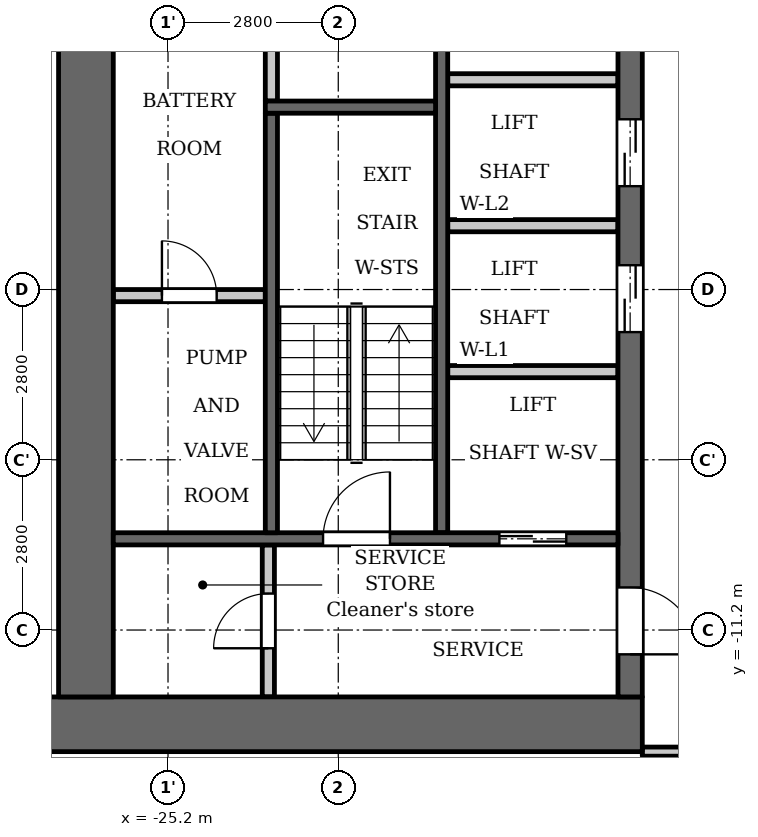
"""IFC4 building model, lengths in metres.
Left out: names, types, materials, properties, quantities, classifications, styles, units other than length and angle.
Written with IfcOpenShell. Run it as: python <this file> out.ifc"""

import sys

from ifc_helpers import new_model, si_unit, direction, frame, frame_2d, origin, place, context, subcontext, project, spatial, rectangle, extrude, element, fill, save


model = new_model("IFC4")
c1 = context("Model", 3, precision=1e-05, world=origin(), true_north=direction((0.0, 1.0)))
c2 = subcontext(c1, "Body", "Model", "MODEL_VIEW")
j1 = project(units=[si_unit("LENGTHUNIT", "METRE"), si_unit("PLANEANGLEUNIT", "RADIAN")], contexts=[c1])
p1 = place(None, origin())
s1 = spatial("IfcSite", under=j1, at=p1, CompositionType="ELEMENT")
p2 = place(p1, origin())
s2 = spatial("IfcBuilding", under=s1, at=p2, CompositionType="ELEMENT")
p3 = place(p2, frame((0.0, 0.0, 93.8)))
s3 = spatial("IfcBuildingStorey", under=s2, at=p3, CompositionType="ELEMENT", Elevation=93.8)
p4 = place(p3, frame((-23.5, -2.5, 0.0), z_axis=(0.0, 0.0, 1.0), x_axis=(0.0, 1.0, 0.0)))
e1 = element("IfcWall", 1, at=p4, inside=s3, PredefinedType="PARTITIONING", context=c2, shape_type="SweptSolid", body=[
    extrude(rectangle(XDim=2.65, YDim=0.2, at=frame_2d((1.325, 0.0))), origin(), (0.0, 0.0, 1.0), 3.2),
])
p5 = place(p3, frame((-20.7, -9.6, 0.0), z_axis=(0.0, 0.0, 1.0), x_axis=(0.0, 1.0, 0.0)))
e2 = element("IfcWall", 2, at=p5, inside=s3, PredefinedType="SHEAR", context=c2, shape_type="SweptSolid", body=[
    extrude(rectangle(XDim=9.75, YDim=0.2, at=frame_2d((4.875, 0.0))), origin(), (0.0, 0.0, 1.0), 3.2),
])
p6 = place(p3, frame((-17.4, -12.75, 0.0), z_axis=(0.0, 0.0, 1.0), x_axis=(-1.0, 0.0, 0.0)))
e3 = element("IfcWall", 3, at=p6, inside=s3, PredefinedType="SHEAR", context=c2, shape_type="SweptSolid", body=[
    extrude(rectangle(XDim=10.4, YDim=0.9, at=frame_2d((5.2, 0.0))), origin(), (0.0, 0.0, 1.0), 3.2),
])
p7 = place(p3, frame((-17.6, -12.3, 0.0), z_axis=(0.0, 0.0, 1.0), x_axis=(0.0, 1.0, 0.0)))
e4 = element("IfcWall", 4, at=p7, inside=s3, PredefinedType="SHEAR", context=c2, shape_type="SweptSolid", body=[
    extrude(rectangle(XDim=24.6, YDim=0.4, at=frame_2d((12.3, 0.0))), origin(), (0.0, 0.0, 1.0), 3.2),
])
p8 = place(p7, frame((6.0, 0.0, 0.0)))
e5 = element("IfcOpeningElement", 5, at=p8, cuts=e4, PredefinedType="OPENING", context=c2, shape_type="SweptSolid", body=[
    extrude(rectangle(XDim=1.1, YDim=2.1, at=frame_2d((0.55, 1.05))), frame((0.0, 0.21, 0.0), z_axis=(0.0, -1.0, 0.0), x_axis=(1.0, 0.0, 0.0)), (0.0, 0.0, 1.0), 0.42),
])
p9 = place(p7, frame((8.4, 0.0, 0.0)))
e6 = element("IfcOpeningElement", 6, at=p9, cuts=e4, PredefinedType="OPENING", context=c2, shape_type="SweptSolid", body=[
    extrude(rectangle(XDim=1.1, YDim=2.1, at=frame_2d((0.55, 1.05))), frame((0.0, 0.21, 0.0), z_axis=(0.0, -1.0, 0.0), x_axis=(1.0, 0.0, 0.0)), (0.0, 0.0, 1.0), 0.42),
])
p10 = place(p7, frame((10.8, 0.0, 0.0)))
e7 = element("IfcOpeningElement", 7, at=p10, cuts=e4, PredefinedType="OPENING", context=c2, shape_type="SweptSolid", body=[
    extrude(rectangle(XDim=1.1, YDim=2.1, at=frame_2d((0.55, 1.05))), frame((0.0, 0.21, 0.0), z_axis=(0.0, -1.0, 0.0), x_axis=(1.0, 0.0, 0.0)), (0.0, 0.0, 1.0), 0.42),
])
p11 = place(p7, frame((16.75, 0.0, 0.0)))
e8 = element("IfcOpeningElement", 8, at=p11, cuts=e4, PredefinedType="OPENING", context=c2, shape_type="SweptSolid", body=[
    extrude(rectangle(XDim=0.9, YDim=2.1, at=frame_2d((0.45, 1.05))), frame((0.0, 0.21, 0.0), z_axis=(0.0, -1.0, 0.0), x_axis=(1.0, 0.0, 0.0)), (0.0, 0.0, 1.0), 0.42),
])
p12 = place(p7, frame((22.8, 0.0, 0.0)))
e9 = element("IfcOpeningElement", 9, at=p12, cuts=e4, PredefinedType="OPENING", context=c2, shape_type="SweptSolid", body=[
    extrude(rectangle(XDim=1.1, YDim=2.1, at=frame_2d((0.55, 1.05))), frame((0.0, 0.21, 0.0), z_axis=(0.0, -1.0, 0.0), x_axis=(1.0, 0.0, 0.0)), (0.0, 0.0, 1.0), 0.42),
])
p13 = place(p7, frame((0.7, 0.0, 0.0)))
e10 = element("IfcOpeningElement", 10, at=p13, cuts=e4, PredefinedType="OPENING", context=c2, shape_type="SweptSolid", body=[
    extrude(rectangle(XDim=1.1, YDim=2.1, at=frame_2d((0.55, 1.05))), frame((0.0, 0.21, 0.0), z_axis=(0.0, -1.0, 0.0), x_axis=(1.0, 0.0, 0.0)), (0.0, 0.0, 1.0), 0.42),
])
p14 = place(p7, frame((12.775, 0.0, 0.0)))
e11 = element("IfcOpeningElement", 11, at=p14, cuts=e4, PredefinedType="OPENING", context=c2, shape_type="SweptSolid", body=[
    extrude(rectangle(XDim=1.8, YDim=2.1, at=frame_2d((0.9, 1.05))), frame((0.0, 0.21, 0.0), z_axis=(0.0, -1.0, 0.0), x_axis=(1.0, 0.0, 0.0)), (0.0, 0.0, 1.0), 0.42),
])
p15 = place(p3, frame((-26.55, -12.3, 0.0), z_axis=(0.0, 0.0, 1.0), x_axis=(0.0, 1.0, 0.0)))
e12 = element("IfcWall", 12, at=p15, inside=s3, PredefinedType="SHEAR", context=c2, shape_type="SweptSolid", body=[
    extrude(rectangle(XDim=24.6, YDim=0.9, at=frame_2d((12.3, 0.0))), origin(), (0.0, 0.0, 1.0), 3.2),
])
p16 = place(p3, frame((-23.55, -12.3, 0.0), z_axis=(0.0, 0.0, 1.0), x_axis=(0.0, 1.0, 0.0)))
e13 = element("IfcWall", 13, at=p16, inside=s3, PredefinedType="PARTITIONING", context=c2, shape_type="SweptSolid", body=[
    extrude(rectangle(XDim=2.5, YDim=0.2, at=frame_2d((1.25, 0.0))), origin(), (0.0, 0.0, 1.0), 3.2),
])
p17 = place(p16, frame((0.8, 0.0, 0.0)))
e14 = element("IfcOpeningElement", 14, at=p17, cuts=e13, PredefinedType="OPENING", context=c2, shape_type="SweptSolid", body=[
    extrude(rectangle(XDim=0.9, YDim=2.1, at=frame_2d((0.45, 1.05))), frame((0.0, 0.11, 0.0), z_axis=(0.0, -1.0, 0.0), x_axis=(1.0, 0.0, 0.0)), (0.0, 0.0, 1.0), 0.22),
])
p18 = place(p3, frame((-23.6, -5.7, 0.0), z_axis=(0.0, 0.0, 1.0), x_axis=(-1.0, 0.0, 0.0)))
e15 = element("IfcWall", 15, at=p18, inside=s3, PredefinedType="PARTITIONING", context=c2, shape_type="SweptSolid", body=[
    extrude(rectangle(XDim=2.5, YDim=0.2, at=frame_2d((1.25, 0.0))), origin(), (0.0, 0.0, 1.0), 3.2),
])
p19 = place(p18, frame((0.8, 0.0, 0.0)))
e16 = element("IfcOpeningElement", 16, at=p19, cuts=e15, PredefinedType="OPENING", context=c2, shape_type="SweptSolid", body=[
    extrude(rectangle(XDim=0.9, YDim=2.1, at=frame_2d((0.45, 1.05))), frame((0.0, 0.11, 0.0), z_axis=(0.0, -1.0, 0.0), x_axis=(1.0, 0.0, 0.0)), (0.0, 0.0, 1.0), 0.22),
])
p20 = place(p3, frame((-17.8, -9.7, 0.0), z_axis=(0.0, 0.0, 1.0), x_axis=(-1.0, 0.0, 0.0)))
e17 = element("IfcWall", 17, at=p20, inside=s3, PredefinedType="SHEAR", context=c2, shape_type="SweptSolid", body=[
    extrude(rectangle(XDim=8.3, YDim=0.2, at=frame_2d((4.15, 0.0))), origin(), (0.0, 0.0, 1.0), 3.2),
])
p21 = place(p20, frame((0.85, 0.0, 0.0)))
e18 = element("IfcOpeningElement", 18, at=p21, cuts=e17, PredefinedType="OPENING", context=c2, shape_type="SweptSolid", body=[
    extrude(rectangle(XDim=1.1, YDim=2.1, at=frame_2d((0.55, 1.05))), frame((0.0, 0.11, 0.0), z_axis=(0.0, -1.0, 0.0), x_axis=(1.0, 0.0, 0.0)), (0.0, 0.0, 1.0), 0.22),
])
p22 = place(p20, frame((3.75, 0.0, 0.0)))
e19 = element("IfcOpeningElement", 19, at=p22, cuts=e17, PredefinedType="OPENING", context=c2, shape_type="SweptSolid", body=[
    extrude(rectangle(XDim=1.1, YDim=2.1, at=frame_2d((0.55, 1.05))), frame((0.0, 0.11, 0.0), z_axis=(0.0, -1.0, 0.0), x_axis=(1.0, 0.0, 0.0)), (0.0, 0.0, 1.0), 0.22),
])
for number, where, z_axis, x_axis in (
    (20, (-17.8, -6.95, 0.0), (0.0, 0.0, 1.0), (-1.0, 0.0, 0.0)),
    (21, (-17.8, -4.55, 0.0), (0.0, 0.0, 1.0), (-1.0, 0.0, 0.0)),
    (22, (-17.8, -2.15, 0.0), (0.0, 0.0, 1.0), (-1.0, 0.0, 0.0)),
):
    element("IfcWall", number, at=place(p3, frame(where, z_axis=z_axis, x_axis=x_axis)), inside=s3, PredefinedType="PARTITIONING", context=c2, shape_type="SweptSolid", body=[
        extrude(rectangle(XDim=2.8, YDim=0.2, at=frame_2d((1.4, 0.0))), origin(), (0.0, 0.0, 1.0), 3.2),
    ])
p23 = place(p3, frame((-23.5, -9.6, 0.0), z_axis=(0.0, 0.0, 1.0), x_axis=(0.0, 1.0, 0.0)))
e23 = element("IfcWall", 23, at=p23, inside=s3, PredefinedType="SHEAR", context=c2, shape_type="SweptSolid", body=[
    extrude(rectangle(XDim=6.9, YDim=0.2, at=frame_2d((3.45, 0.0))), origin(), (0.0, 0.0, 1.0), 3.2),
])
p24 = place(p3, frame((-20.8, -2.6, 0.0), z_axis=(0.0, 0.0, 1.0), x_axis=(-1.0, 0.0, 0.0)))
e24 = element("IfcWall", 24, at=p24, inside=s3, PredefinedType="SHEAR", context=c2, shape_type="SweptSolid", body=[
    extrude(rectangle(XDim=2.8, YDim=0.2, at=frame_2d((1.4, 0.0))), origin(), (0.0, 0.0, 1.0), 3.2),
])
p25 = place(p3, frame((-17.4, -13.2, 0.0), z_axis=(0.0, 0.0, 1.0), x_axis=(1.0, 0.0, 0.0)))
e25 = element("IfcWall", 25, at=p25, inside=s3, PredefinedType="PARTITIONING", context=c2, shape_type="SweptSolid", body=[
    extrude(rectangle(XDim=34.8, YDim=0.15, at=frame_2d((17.4, 0.0))), origin(), (0.0, 0.0, 1.0), 3.2),
])
p26 = place(p25, frame((0.65, 0.0, 0.0)))
e26 = element("IfcOpeningElement", 26, at=p26, cuts=e25, PredefinedType="OPENING", context=c2, shape_type="SweptSolid", body=[
    extrude(rectangle(XDim=1.0, YDim=2.1, at=frame_2d((0.5, 1.05))), frame((0.0, 0.085, 0.0), z_axis=(0.0, -1.0, 0.0), x_axis=(1.0, 0.0, 0.0)), (0.0, 0.0, 1.0), 0.17),
])
p27 = place(p25, frame((33.05, 0.0, 0.0)))
e27 = element("IfcOpeningElement", 27, at=p27, cuts=e25, PredefinedType="OPENING", context=c2, shape_type="SweptSolid", body=[
    extrude(rectangle(XDim=1.0, YDim=2.1, at=frame_2d((0.5, 1.05))), frame((0.0, 0.085, 0.0), z_axis=(0.0, -1.0, 0.0), x_axis=(1.0, 0.0, 0.0)), (0.0, 0.0, 1.0), 0.17),
])
p28 = place(p25, frame((4.55, 0.0, 0.0)))
e28 = element("IfcOpeningElement", 28, at=p28, cuts=e25, PredefinedType="OPENING", context=c2, shape_type="SweptSolid", body=[
    extrude(rectangle(XDim=1.0, YDim=2.1, at=frame_2d((0.5, 1.05))), frame((0.0, 0.085, 0.0), z_axis=(0.0, -1.0, 0.0), x_axis=(1.0, 0.0, 0.0)), (0.0, 0.0, 1.0), 0.17),
])
p29 = place(p25, frame((21.35, 0.0, 0.0)))
e29 = element("IfcOpeningElement", 29, at=p29, cuts=e25, PredefinedType="OPENING", context=c2, shape_type="SweptSolid", body=[
    extrude(rectangle(XDim=1.0, YDim=2.1, at=frame_2d((0.5, 1.05))), frame((0.0, 0.085, 0.0), z_axis=(0.0, -1.0, 0.0), x_axis=(1.0, 0.0, 0.0)), (0.0, 0.0, 1.0), 0.17),
])
p30 = place(p25, frame((30.75, 0.0, 0.0)))
e30 = element("IfcOpeningElement", 30, at=p30, cuts=e25, PredefinedType="OPENING", context=c2, shape_type="SweptSolid", body=[
    extrude(rectangle(XDim=1.0, YDim=2.1, at=frame_2d((0.5, 1.05))), frame((0.0, 0.085, 0.0), z_axis=(0.0, -1.0, 0.0), x_axis=(1.0, 0.0, 0.0)), (0.0, 0.0, 1.0), 0.17),
])
p31 = place(p21, origin())
e31 = element("IfcDoor", 31, at=p31, inside=s3, OperationType="DOUBLE_DOOR_SLIDING", PredefinedType="DOOR", context=c2, shape_type="SweptSolid", body=[
    extrude(rectangle(XDim=1.1, YDim=2.1, at=frame_2d((0.55, 1.05))), frame((0.0, 0.025, 0.0), z_axis=(0.0, -1.0, 0.0), x_axis=(1.0, 0.0, 0.0)), (0.0, 0.0, 1.0), 0.05),
])
fill(e18, e31)
p32 = place(p8, origin())
e32 = element("IfcDoor", 32, at=p32, inside=s3, OperationType="DOUBLE_DOOR_SLIDING", PredefinedType="DOOR", context=c2, shape_type="SweptSolid", body=[
    extrude(rectangle(XDim=1.1, YDim=2.1, at=frame_2d((0.55, 1.05))), frame((0.0, 0.025, 0.0), z_axis=(0.0, -1.0, 0.0), x_axis=(1.0, 0.0, 0.0)), (0.0, 0.0, 1.0), 0.05),
])
fill(e5, e32)
p33 = place(p9, origin())
e33 = element("IfcDoor", 33, at=p33, inside=s3, OperationType="DOUBLE_DOOR_SLIDING", PredefinedType="DOOR", context=c2, shape_type="SweptSolid", body=[
    extrude(rectangle(XDim=1.1, YDim=2.1, at=frame_2d((0.55, 1.05))), frame((0.0, 0.025, 0.0), z_axis=(0.0, -1.0, 0.0), x_axis=(1.0, 0.0, 0.0)), (0.0, 0.0, 1.0), 0.05),
])
fill(e6, e33)
p34 = place(p13, origin())
e34 = element("IfcDoor", 34, at=p34, inside=s3, OperationType="SINGLE_SWING_LEFT", PredefinedType="DOOR", context=c2, shape_type="SweptSolid", body=[
    extrude(rectangle(XDim=1.1, YDim=2.1, at=frame_2d((0.55, 1.05))), frame((0.0, 0.025, 0.0), z_axis=(0.0, -1.0, 0.0), x_axis=(1.0, 0.0, 0.0)), (0.0, 0.0, 1.0), 0.05),
])
fill(e10, e34)
p35 = place(p17, origin())
e35 = element("IfcDoor", 35, at=p35, inside=s3, OperationType="SINGLE_SWING_RIGHT", PredefinedType="DOOR", context=c2, shape_type="SweptSolid", body=[
    extrude(rectangle(XDim=0.9, YDim=2.1, at=frame_2d((0.45, 1.05))), frame((0.0, 0.025, 0.0), z_axis=(0.0, -1.0, 0.0), x_axis=(1.0, 0.0, 0.0)), (0.0, 0.0, 1.0), 0.05),
])
fill(e14, e35)
p36 = place(p22, origin())
e36 = element("IfcDoor", 36, at=p36, inside=s3, OperationType="SINGLE_SWING_LEFT", PredefinedType="DOOR", context=c2, shape_type="SweptSolid", body=[
    extrude(rectangle(XDim=1.1, YDim=2.1, at=frame_2d((0.55, 1.05))), frame((0.0, 0.025, 0.0), z_axis=(0.0, -1.0, 0.0), x_axis=(1.0, 0.0, 0.0)), (0.0, 0.0, 1.0), 0.05),
])
fill(e19, e36)
p37 = place(p19, origin())
e37 = element("IfcDoor", 37, at=p37, inside=s3, OperationType="SINGLE_SWING_RIGHT", PredefinedType="DOOR", context=c2, shape_type="SweptSolid", body=[
    extrude(rectangle(XDim=0.9, YDim=2.1, at=frame_2d((0.45, 1.05))), frame((0.0, 0.025, 0.0), z_axis=(0.0, -1.0, 0.0), x_axis=(1.0, 0.0, 0.0)), (0.0, 0.0, 1.0), 0.05),
])
fill(e16, e37)
save(model, sys.argv[1])
